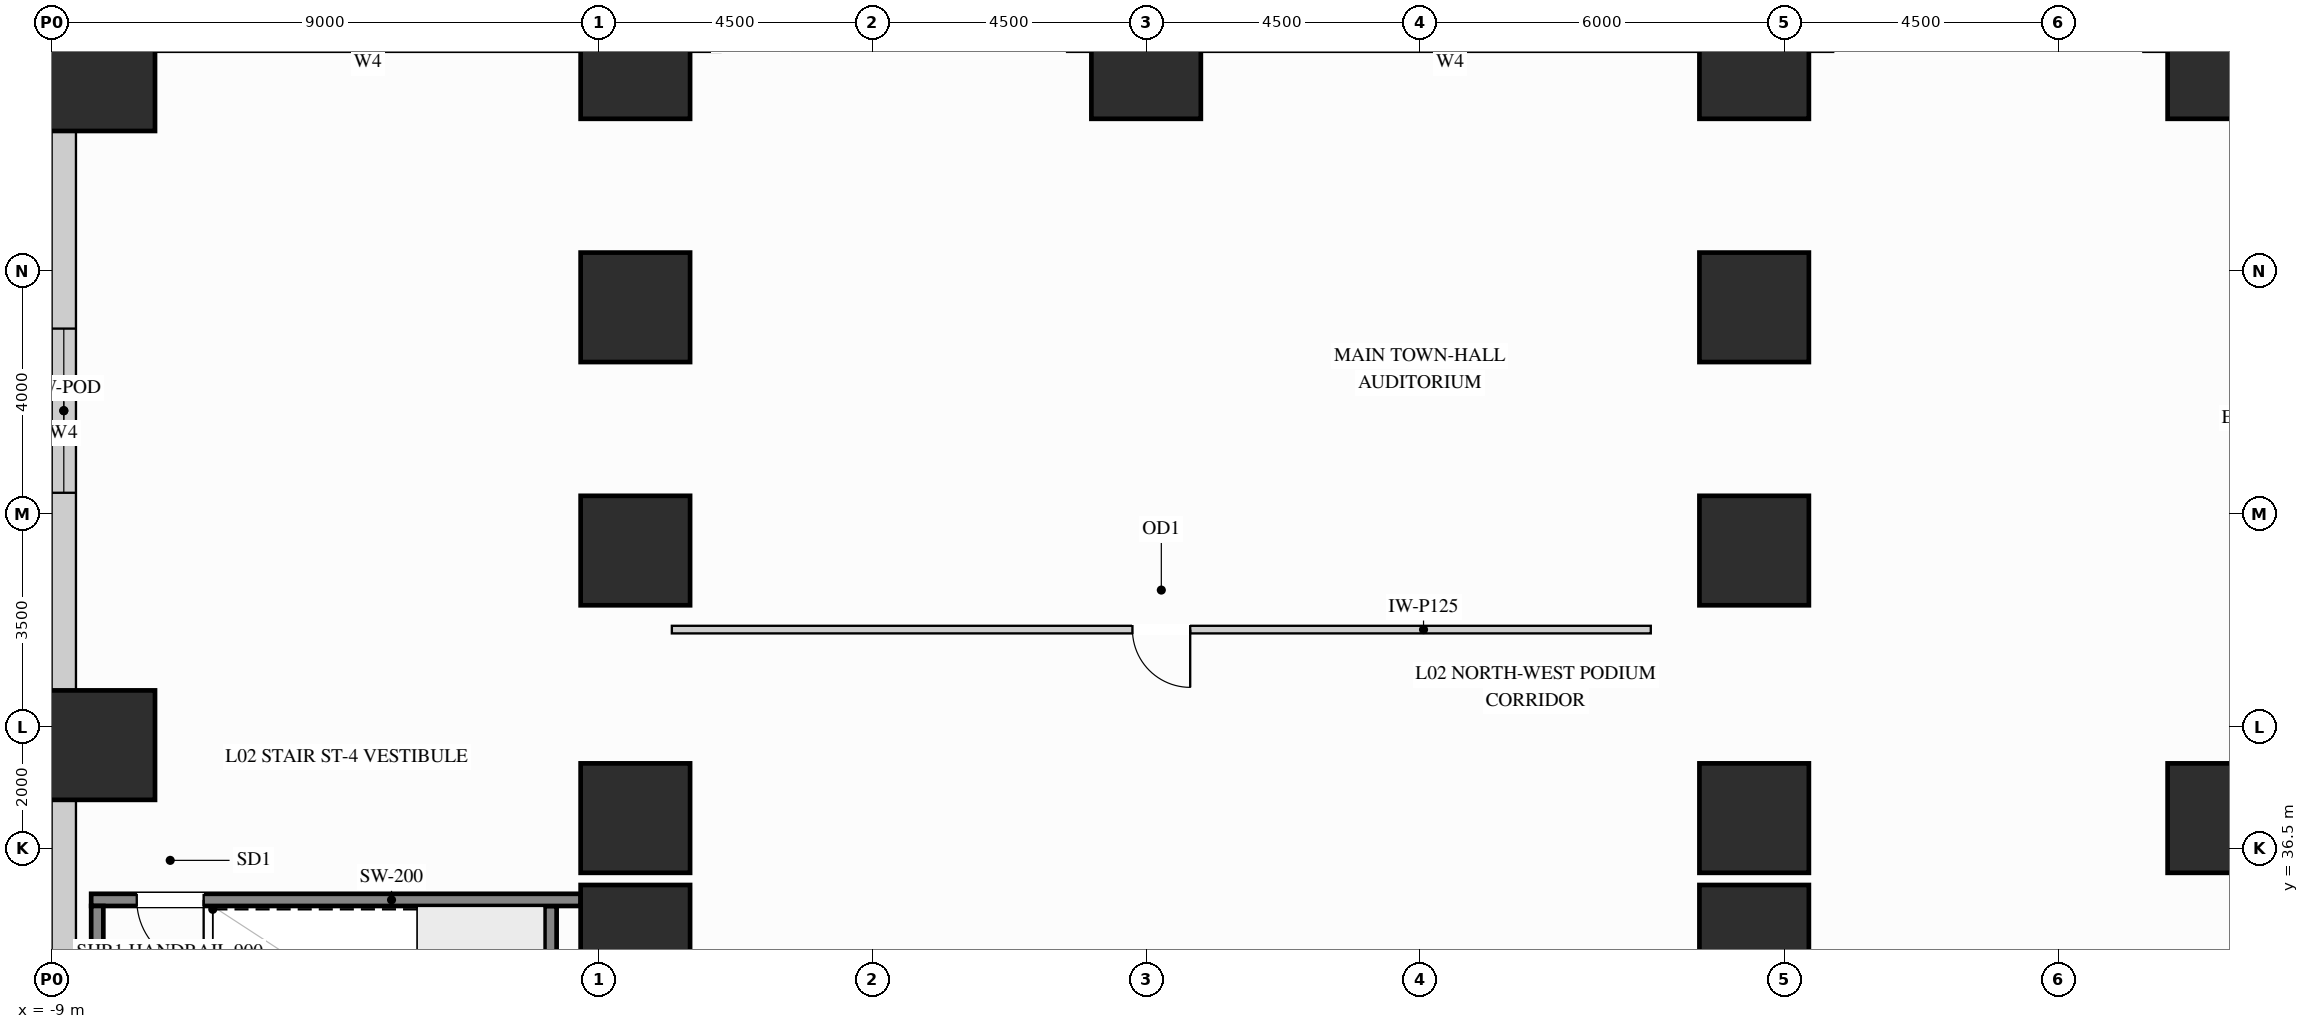
"""IFC4 building model, lengths in metres.
Left out: names, types, materials, properties, quantities, classifications, styles, units other than length and angle.
Written with IfcOpenShell. Run it as: python <this file> out.ifc"""

import sys

from ifc_helpers import new_model, si_unit, direction, frame, frame_2d, origin, origin_2d, place, context, subcontext, project, spatial, rectangle, extrude, source, transform, mapped, element, fill, save


model = new_model("IFC4")
c1 = context("Model", 3, precision=1e-05, world=origin(), true_north=direction((0.0, 1.0)))
c2 = subcontext(c1, "Body", "Model", "MODEL_VIEW")
j1 = project(units=[si_unit("LENGTHUNIT", "METRE"), si_unit("PLANEANGLEUNIT", "RADIAN")], contexts=[c1])
p1 = place(None, origin())
s1 = spatial("IfcSite", under=j1, at=p1, CompositionType="ELEMENT")
p2 = place(p1, origin())
s2 = spatial("IfcBuilding", under=s1, at=p2, CompositionType="ELEMENT")
p3 = place(p2, frame((0.0, 0.0, 9.0)))
s3 = spatial("IfcBuildingStorey", under=s2, at=p3, CompositionType="ELEMENT", Elevation=9.0)
m1 = source(origin(), c2, "Body", "SweptSolid", [
    extrude(rectangle(XDim=1.8, YDim=1.8, at=origin_2d()), origin(), (0.0, 0.0, 1.0), 4.25),
])
for number, where, z_axis, x_axis in (
    (1, (-8.2, 38.2, 0.0), (0.0, 0.0, 1.0), (1.0, 0.0, 0.0)),
    (2, (-8.2, 49.2, 0.0), (0.0, 0.0, 1.0), (1.0, 0.0, 0.0)),
    (3, (0.6, 35.0, 0.0), (0.0, 0.0, 1.0), (1.0, 0.0, 0.0)),
    (4, (0.6, 37.0, 0.0), (0.0, 0.0, 1.0), (1.0, 0.0, 0.0)),
    (5, (0.6, 41.4, 0.0), (0.0, 0.0, 1.0), (1.0, 0.0, 0.0)),
    (6, (0.6, 45.4, 0.0), (0.0, 0.0, 1.0), (1.0, 0.0, 0.0)),
    (7, (0.6, 49.4, 0.0), (0.0, 0.0, 1.0), (1.0, 0.0, 0.0)),
    (8, (9.0, 49.4, 0.0), (0.0, 0.0, 1.0), (1.0, 0.0, 0.0)),
    (9, (19.0, 49.4, 0.0), (0.0, 0.0, 1.0), (1.0, 0.0, 0.0)),
    (10, (26.7, 49.4, 0.0), (0.0, 0.0, 1.0), (1.0, 0.0, 0.0)),
    (11, (26.7, 37.0, 0.0), (0.0, 0.0, 1.0), (1.0, 0.0, 0.0)),
    (12, (19.0, 35.0, 0.0), (0.0, 0.0, 1.0), (1.0, 0.0, 0.0)),
    (13, (19.0, 37.0, 0.0), (0.0, 0.0, 1.0), (1.0, 0.0, 0.0)),
    (14, (19.0, 41.4, 0.0), (0.0, 0.0, 1.0), (1.0, 0.0, 0.0)),
    (15, (19.0, 45.4, 0.0), (0.0, 0.0, 1.0), (1.0, 0.0, 0.0)),
):
    element("IfcColumn", number, at=place(p3, frame(where, z_axis=z_axis, x_axis=x_axis)), inside=s3, PredefinedType="COLUMN", context=c2, shape_type="MappedRepresentation", body=[
        mapped(m1, transform((0.0, 0.0, 0.0), x_axis=(1.0, 0.0, 0.0), y_axis=(0.0, 1.0, 0.0), z_axis=(0.0, 0.0, 1.0))),
    ])
p4 = place(p3, frame((-8.8, 48.302, 0.0), z_axis=(0.0, 0.0, 1.0), x_axis=(0.0, -1.0, 0.0)))
e16 = element("IfcWall", 16, at=p4, inside=s3, PredefinedType="SOLIDWALL", context=c2, shape_type="SweptSolid", body=[
    extrude(rectangle(XDim=9.204, YDim=0.4, at=frame_2d((4.602, 0.0))), origin(), (0.0, 0.0, 1.0), 3.185),
])
p5 = place(p4, frame((3.252, 0.0, 0.65)))
e17 = element("IfcOpeningElement", 17, at=p5, cuts=e16, PredefinedType="OPENING", context=c2, shape_type="SweptSolid", body=[
    extrude(rectangle(XDim=2.7, YDim=2.355, at=frame_2d((1.35, 1.177))), frame((0.0, 0.21, 0.0), z_axis=(0.0, -1.0, 0.0), x_axis=(1.0, 0.0, 0.0)), (0.0, 0.0, 1.0), 0.42),
])
p6 = place(p3, frame((-8.8, 37.302, 0.0), z_axis=(0.0, 0.0, 1.0), x_axis=(0.0, -1.0, 0.0)))
e18 = element("IfcWall", 18, at=p6, inside=s3, PredefinedType="SOLIDWALL", context=c2, shape_type="SweptSolid", body=[
    extrude(rectangle(XDim=9.604, YDim=0.4, at=frame_2d((4.802, 0.0))), origin(), (0.0, 0.0, 1.0), 3.185),
])
p7 = place(p6, frame((3.452, 0.0, 0.65)))
e19 = element("IfcOpeningElement", 19, at=p7, cuts=e18, PredefinedType="OPENING", context=c2, shape_type="SweptSolid", body=[
    extrude(rectangle(XDim=2.7, YDim=2.355, at=frame_2d((1.35, 1.177))), frame((0.0, 0.21, 0.0), z_axis=(0.0, -1.0, 0.0), x_axis=(1.0, 0.0, 0.0)), (0.0, 0.0, 1.0), 0.42),
])
p8 = place(p3, frame((1.2, 40.1, 0.0), z_axis=(0.0, 0.0, 1.0), x_axis=(1.0, 0.0, 0.0)))
e20 = element("IfcWall", 20, at=p8, inside=s3, PredefinedType="PARTITIONING", context=c2, shape_type="SweptSolid", body=[
    extrude(rectangle(XDim=16.1, YDim=0.125, at=frame_2d((8.05, 0.0))), origin(), (0.0, 0.0, 1.0), 3.686),
])
p9 = place(p8, frame((7.575, 0.0, 0.0)))
e21 = element("IfcOpeningElement", 21, at=p9, cuts=e20, PredefinedType="OPENING", context=c2, shape_type="SweptSolid", body=[
    extrude(rectangle(XDim=0.95, YDim=2.15, at=frame_2d((0.475, 1.075))), frame((0.0, 0.073, 0.0), z_axis=(0.0, -1.0, 0.0), x_axis=(1.0, 0.0, 0.0)), (0.0, 0.0, 1.0), 0.145),
])
m2 = source(origin(), c2, "Body", "SweptSolid", [
    extrude(rectangle(XDim=3.56, YDim=0.2, at=frame_2d((1.78, 0.0))), origin(), (0.0, 0.0, 1.0), 4.25),
])
p10 = place(p3, frame((-0.795, 31.995, 0.0), z_axis=(0.0, 0.0, 1.0), x_axis=(0.0, 1.0, 0.0)))
e22 = element("IfcWall", 22, at=p10, inside=s3, PredefinedType="SHEAR", context=c2, shape_type="MappedRepresentation", body=[
    mapped(m2, transform((0.0, 0.0, 0.0), x_axis=(1.0, 0.0, 0.0), y_axis=(0.0, 1.0, 0.0), z_axis=(0.0, 0.0, 1.0))),
])
p11 = place(p3, frame((-8.35, 35.655, 0.0), z_axis=(0.0, 0.0, 1.0), x_axis=(1.0, 0.0, 0.0)))
e23 = element("IfcWall", 23, at=p11, inside=s3, PredefinedType="SHEAR", context=c2, shape_type="SweptSolid", body=[
    extrude(rectangle(XDim=8.05, YDim=0.2, at=frame_2d((4.025, 0.0))), origin(), (0.0, 0.0, 1.0), 4.25),
])
p12 = place(p11, frame((0.75, 0.0, 0.0)))
e24 = element("IfcOpeningElement", 24, at=p12, cuts=e23, PredefinedType="OPENING", context=c2, shape_type="SweptSolid", body=[
    extrude(rectangle(XDim=1.1, YDim=2.15, at=frame_2d((0.55, 1.075))), frame((0.0, 0.11, 0.0), z_axis=(0.0, -1.0, 0.0), x_axis=(1.0, 0.0, 0.0)), (0.0, 0.0, 1.0), 0.22),
])
p13 = place(p3, frame((-8.25, 31.995, 0.0), z_axis=(0.0, 0.0, 1.0), x_axis=(0.0, 1.0, 0.0)))
e25 = element("IfcWall", 25, at=p13, inside=s3, PredefinedType="SHEAR", context=c2, shape_type="MappedRepresentation", body=[
    mapped(m2, transform((0.0, 0.0, 0.0), x_axis=(1.0, 0.0, 0.0), y_axis=(0.0, 1.0, 0.0), z_axis=(0.0, 0.0, 1.0))),
])
m3 = source(origin(), c2, "Body", "SweptSolid", [
    extrude(rectangle(XDim=0.95, YDim=2.15, at=frame_2d((0.475, 1.075))), frame((0.0, 0.025, 0.0), z_axis=(0.0, -1.0, 0.0), x_axis=(1.0, 0.0, 0.0)), (0.0, 0.0, 1.0), 0.05),
])
p14 = place(p9, origin())
e26 = element("IfcDoor", 26, at=p14, inside=s3, OperationType="SINGLE_SWING_RIGHT", PredefinedType="DOOR", context=c2, shape_type="MappedRepresentation", body=[
    mapped(m3, transform((0.0, 0.0, 0.0), x_axis=(1.0, 0.0, 0.0), y_axis=(0.0, 1.0, 0.0), z_axis=(0.0, 0.0, 1.0))),
])
fill(e21, e26)
m4 = source(origin(), c2, "Body", "SweptSolid", [
    extrude(rectangle(XDim=1.1, YDim=2.15, at=frame_2d((0.55, 1.075))), frame((0.0, 0.025, 0.0), z_axis=(0.0, -1.0, 0.0), x_axis=(1.0, 0.0, 0.0)), (0.0, 0.0, 1.0), 0.05),
])
p15 = place(p12, origin())
e27 = element("IfcDoor", 27, at=p15, inside=s3, OperationType="SINGLE_SWING_RIGHT", PredefinedType="DOOR", context=c2, shape_type="MappedRepresentation", body=[
    mapped(m4, transform((0.0, 0.0, 0.0), x_axis=(1.0, 0.0, 0.0), y_axis=(0.0, 1.0, 0.0), z_axis=(0.0, 0.0, 1.0))),
])
fill(e24, e27)
m5 = source(origin(), c2, "Body", "SweptSolid", [
    extrude(rectangle(XDim=2.7, YDim=2.355, at=frame_2d((1.35, 1.177))), frame((0.0, 0.03, 0.0), z_axis=(0.0, -1.0, 0.0), x_axis=(1.0, 0.0, 0.0)), (0.0, 0.0, 1.0), 0.06),
])
p16 = place(p5, origin())
e28 = element("IfcWindow", 28, at=p16, inside=s3, PartitioningType="SINGLE_PANEL", PredefinedType="WINDOW", context=c2, shape_type="MappedRepresentation", body=[
    mapped(m5, transform((0.0, 0.0, 0.0), x_axis=(1.0, 0.0, 0.0), y_axis=(0.0, 1.0, 0.0), z_axis=(0.0, 0.0, 1.0))),
])
fill(e17, e28)
save(model, sys.argv[1])
